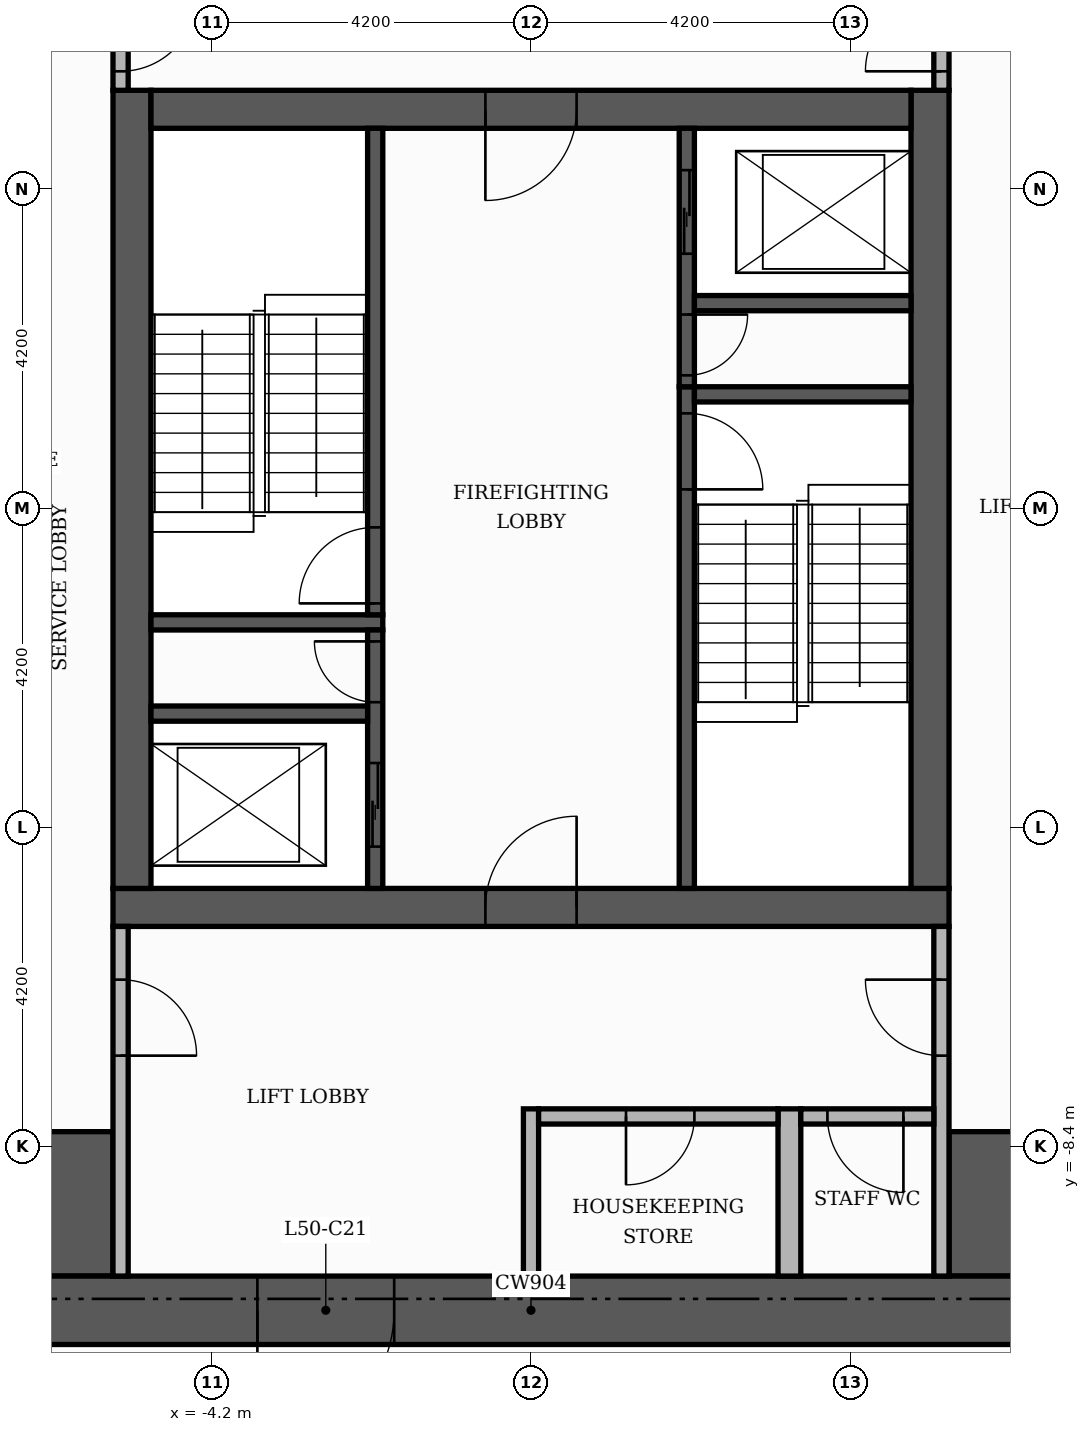
"""IFC4 building model, lengths in metres.
Left out: names, types, materials, properties, quantities, classifications, styles, units other than length and angle.
Written with IfcOpenShell. Run it as: python <this file> out.ifc"""

import sys

from ifc_helpers import new_model, si_unit, direction, frame, frame_2d, origin, place, context, subcontext, project, spatial, rectangle, extrude, element, fill, save


model = new_model("IFC4")
c1 = context("Model", 3, precision=1e-05, world=origin(), true_north=direction((0.0, 1.0)))
c2 = subcontext(c1, "Body", "Model", "MODEL_VIEW")
j1 = project(units=[si_unit("LENGTHUNIT", "METRE"), si_unit("PLANEANGLEUNIT", "RADIAN")], contexts=[c1])
p1 = place(None, origin())
s1 = spatial("IfcSite", under=j1, at=p1, CompositionType="ELEMENT")
p2 = place(p1, origin())
s2 = spatial("IfcBuilding", under=s1, at=p2, CompositionType="ELEMENT")
p3 = place(p2, frame((0.0, 0.0, 211.8)))
s3 = spatial("IfcBuildingStorey", under=s2, at=p3, CompositionType="ELEMENT", Elevation=211.8)
p4 = place(p3, frame((-5.5, -5.25, 0.0), z_axis=(0.0, 0.0, 1.0), x_axis=(1.0, 0.0, 0.0)))
e1 = element("IfcWall", 1, at=p4, inside=s3, PredefinedType="SHEAR", context=c2, shape_type="SweptSolid", body=[
    extrude(rectangle(XDim=11.0, YDim=0.5, at=frame_2d((5.5, 0.0))), origin(), (0.0, 0.0, 1.0), 3.48),
])
p5 = place(p4, frame((4.9, 0.0, 0.0)))
e2 = element("IfcOpeningElement", 2, at=p5, cuts=e1, PredefinedType="OPENING", context=c2, shape_type="SweptSolid", body=[
    extrude(rectangle(XDim=1.2, YDim=2.1, at=frame_2d((0.6, 1.05))), frame((0.0, 0.26, 0.0), z_axis=(0.0, -1.0, 0.0), x_axis=(1.0, 0.0, 0.0)), (0.0, 0.0, 1.0), 0.52),
])
for number, where, z_axis, x_axis in (
    (3, (-5.25, -5.0, 0.0), (0.0, 0.0, 1.0), (0.0, 1.0, 0.0)),
    (4, (5.25, -5.0, 0.0), (0.0, 0.0, 1.0), (0.0, 1.0, 0.0)),
):
    element("IfcWall", number, at=place(p3, frame(where, z_axis=z_axis, x_axis=x_axis)), inside=s3, PredefinedType="SHEAR", context=c2, shape_type="SweptSolid", body=[
        extrude(rectangle(XDim=10.5, YDim=0.5, at=frame_2d((5.25, 0.0))), origin(), (0.0, 0.0, 1.0), 3.48),
    ])
p6 = place(p3, frame((-5.0, 5.25, 0.0), z_axis=(0.0, 0.0, 1.0), x_axis=(1.0, 0.0, 0.0)))
e5 = element("IfcWall", 5, at=p6, inside=s3, PredefinedType="SHEAR", context=c2, shape_type="SweptSolid", body=[
    extrude(rectangle(XDim=10.0, YDim=0.5, at=frame_2d((5.0, 0.0))), origin(), (0.0, 0.0, 1.0), 3.48),
])
p7 = place(p6, frame((4.4, 0.0, 0.0)))
e6 = element("IfcOpeningElement", 6, at=p7, cuts=e5, PredefinedType="OPENING", context=c2, shape_type="SweptSolid", body=[
    extrude(rectangle(XDim=1.2, YDim=2.1, at=frame_2d((0.6, 1.05))), frame((0.0, 0.26, 0.0), z_axis=(0.0, -1.0, 0.0), x_axis=(1.0, 0.0, 0.0)), (0.0, 0.0, 1.0), 0.52),
])
for number, where, z_axis, x_axis in (
    (7, (-10.1, -9.15, 0.0), (0.0, 0.0, 1.0), (1.0, 0.0, 0.0)),
    (8, (5.5, -9.15, 0.0), (0.0, 0.0, 1.0), (1.0, 0.0, 0.0)),
):
    element("IfcWall", number, at=place(p3, frame(where, z_axis=z_axis, x_axis=x_axis)), inside=s3, PredefinedType="SHEAR", context=c2, shape_type="SweptSolid", body=[
        extrude(rectangle(XDim=4.6, YDim=1.9, at=frame_2d((2.3, 0.0))), origin(), (0.0, 0.0, 1.0), 3.48),
    ])
p8 = place(p3, frame((2.05, -5.0, 0.0), z_axis=(0.0, 0.0, 1.0), x_axis=(0.0, 1.0, 0.0)))
e9 = element("IfcWall", 9, at=p8, inside=s3, PredefinedType="SHEAR", context=c2, shape_type="SweptSolid", body=[
    extrude(rectangle(XDim=6.6, YDim=0.2, at=frame_2d((3.3, 0.0))), origin(), (0.0, 0.0, 1.0), 3.48),
])
p9 = place(p8, frame((5.25, 0.0, 0.0)))
e10 = element("IfcOpeningElement", 10, at=p9, cuts=e9, PredefinedType="OPENING", context=c2, shape_type="SweptSolid", body=[
    extrude(rectangle(XDim=1.0, YDim=2.1, at=frame_2d((0.5, 1.05))), frame((0.0, 0.11, 0.0), z_axis=(0.0, -1.0, 0.0), x_axis=(1.0, 0.0, 0.0)), (0.0, 0.0, 1.0), 0.22),
])
p10 = place(p3, frame((-5.0, -1.5, 0.0), z_axis=(0.0, 0.0, 1.0), x_axis=(1.0, 0.0, 0.0)))
e11 = element("IfcWall", 11, at=p10, inside=s3, PredefinedType="SHEAR", context=c2, shape_type="SweptSolid", body=[
    extrude(rectangle(XDim=3.05, YDim=0.2, at=frame_2d((1.525, 0.0))), origin(), (0.0, 0.0, 1.0), 3.48),
])
p11 = place(p3, frame((-2.05, -1.4, 0.0), z_axis=(0.0, 0.0, 1.0), x_axis=(0.0, 1.0, 0.0)))
e12 = element("IfcWall", 12, at=p11, inside=s3, PredefinedType="SHEAR", context=c2, shape_type="SweptSolid", body=[
    extrude(rectangle(XDim=6.4, YDim=0.2, at=frame_2d((3.2, 0.0))), origin(), (0.0, 0.0, 1.0), 3.48),
])
p12 = place(p11, frame((0.15, 0.0, 0.0)))
e13 = element("IfcOpeningElement", 13, at=p12, cuts=e12, PredefinedType="OPENING", context=c2, shape_type="SweptSolid", body=[
    extrude(rectangle(XDim=1.0, YDim=2.1, at=frame_2d((0.5, 1.05))), frame((0.0, 0.11, 0.0), z_axis=(0.0, -1.0, 0.0), x_axis=(1.0, 0.0, 0.0)), (0.0, 0.0, 1.0), 0.22),
])
p13 = place(p3, frame((2.15, 1.5, 0.0), z_axis=(0.0, 0.0, 1.0), x_axis=(1.0, 0.0, 0.0)))
e14 = element("IfcWall", 14, at=p13, inside=s3, PredefinedType="SHEAR", context=c2, shape_type="SweptSolid", body=[
    extrude(rectangle(XDim=2.85, YDim=0.2, at=frame_2d((1.425, 0.0))), origin(), (0.0, 0.0, 1.0), 3.48),
])
p14 = place(p3, frame((-2.05, -5.0, 0.0), z_axis=(0.0, 0.0, 1.0), x_axis=(0.0, 1.0, 0.0)))
e15 = element("IfcWall", 15, at=p14, inside=s3, PredefinedType="SHEAR", context=c2, shape_type="SweptSolid", body=[
    extrude(rectangle(XDim=3.4, YDim=0.2, at=frame_2d((1.7, 0.0))), origin(), (0.0, 0.0, 1.0), 3.48),
])
p15 = place(p14, frame((0.55, 0.0, 0.0)))
e16 = element("IfcOpeningElement", 16, at=p15, cuts=e15, PredefinedType="OPENING", context=c2, shape_type="SweptSolid", body=[
    extrude(rectangle(XDim=1.1, YDim=2.1, at=frame_2d((0.55, 1.05))), frame((0.0, 0.11, 0.0), z_axis=(0.0, -1.0, 0.0), x_axis=(1.0, 0.0, 0.0)), (0.0, 0.0, 1.0), 0.22),
])
p16 = place(p14, frame((2.45, 0.0, 0.0)))
e17 = element("IfcOpeningElement", 17, at=p16, cuts=e15, PredefinedType="OPENING", context=c2, shape_type="SweptSolid", body=[
    extrude(rectangle(XDim=0.8, YDim=2.1, at=frame_2d((0.4, 1.05))), frame((0.0, 0.11, 0.0), z_axis=(0.0, -1.0, 0.0), x_axis=(1.0, 0.0, 0.0)), (0.0, 0.0, 1.0), 0.22),
])
p17 = place(p3, frame((-5.0, -2.7, 0.0), z_axis=(0.0, 0.0, 1.0), x_axis=(1.0, 0.0, 0.0)))
e18 = element("IfcWall", 18, at=p17, inside=s3, PredefinedType="SHEAR", context=c2, shape_type="SweptSolid", body=[
    extrude(rectangle(XDim=2.85, YDim=0.2, at=frame_2d((1.425, 0.0))), origin(), (0.0, 0.0, 1.0), 3.48),
])
p18 = place(p3, frame((2.05, 1.6, 0.0), z_axis=(0.0, 0.0, 1.0), x_axis=(0.0, 1.0, 0.0)))
e19 = element("IfcWall", 19, at=p18, inside=s3, PredefinedType="SHEAR", context=c2, shape_type="SweptSolid", body=[
    extrude(rectangle(XDim=3.4, YDim=0.2, at=frame_2d((1.7, 0.0))), origin(), (0.0, 0.0, 1.0), 3.48),
])
p19 = place(p18, frame((1.75, 0.0, 0.0)))
e20 = element("IfcOpeningElement", 20, at=p19, cuts=e19, PredefinedType="OPENING", context=c2, shape_type="SweptSolid", body=[
    extrude(rectangle(XDim=1.1, YDim=2.1, at=frame_2d((0.55, 1.05))), frame((0.0, 0.11, 0.0), z_axis=(0.0, -1.0, 0.0), x_axis=(1.0, 0.0, 0.0)), (0.0, 0.0, 1.0), 0.22),
])
p20 = place(p18, frame((0.15, 0.0, 0.0)))
e21 = element("IfcOpeningElement", 21, at=p20, cuts=e19, PredefinedType="OPENING", context=c2, shape_type="SweptSolid", body=[
    extrude(rectangle(XDim=0.8, YDim=2.1, at=frame_2d((0.4, 1.05))), frame((0.0, 0.11, 0.0), z_axis=(0.0, -1.0, 0.0), x_axis=(1.0, 0.0, 0.0)), (0.0, 0.0, 1.0), 0.22),
])
p21 = place(p3, frame((2.15, 2.7, 0.0), z_axis=(0.0, 0.0, 1.0), x_axis=(1.0, 0.0, 0.0)))
e22 = element("IfcWall", 22, at=p21, inside=s3, PredefinedType="SHEAR", context=c2, shape_type="SweptSolid", body=[
    extrude(rectangle(XDim=2.85, YDim=0.2, at=frame_2d((1.425, 0.0))), origin(), (0.0, 0.0, 1.0), 3.48),
])
p22 = place(p3, frame((-11.0, -10.55, 0.0), z_axis=(0.0, 0.0, 1.0), x_axis=(1.0, 0.0, 0.0)))
e23 = element("IfcWall", 23, at=p22, inside=s3, PredefinedType="SHEAR", context=c2, shape_type="SweptSolid", body=[
    extrude(rectangle(XDim=22.0, YDim=0.9, at=frame_2d((11.0, 0.0))), origin(), (0.0, 0.0, 1.0), 3.48),
])
p23 = place(p22, frame((7.4, 0.0, 0.0)))
e24 = element("IfcOpeningElement", 24, at=p23, cuts=e23, PredefinedType="OPENING", context=c2, shape_type="SweptSolid", body=[
    extrude(rectangle(XDim=1.8, YDim=2.2, at=frame_2d((0.9, 1.1))), frame((0.0, 0.46, 0.0), z_axis=(0.0, -1.0, 0.0), x_axis=(1.0, 0.0, 0.0)), (0.0, 0.0, 1.0), 0.92),
])
p24 = place(p3, frame((-5.4, -10.1, 0.0), z_axis=(0.0, 0.0, 1.0), x_axis=(0.0, 1.0, 0.0)))
e25 = element("IfcWall", 25, at=p24, inside=s3, PredefinedType="PARTITIONING", context=c2, shape_type="SweptSolid", body=[
    extrude(rectangle(XDim=4.6, YDim=0.2, at=frame_2d((2.3, 0.0))), origin(), (0.0, 0.0, 1.0), 3.48),
])
p25 = place(p24, frame((2.9, 0.0, 0.0)))
e26 = element("IfcOpeningElement", 26, at=p25, cuts=e25, PredefinedType="OPENING", context=c2, shape_type="SweptSolid", body=[
    extrude(rectangle(XDim=1.0, YDim=2.1, at=frame_2d((0.5, 1.05))), frame((0.0, 0.11, 0.0), z_axis=(0.0, -1.0, 0.0), x_axis=(1.0, 0.0, 0.0)), (0.0, 0.0, 1.0), 0.22),
])
p26 = place(p3, frame((0.0, -10.1, 0.0), z_axis=(0.0, 0.0, 1.0), x_axis=(0.0, 1.0, 0.0)))
e27 = element("IfcWall", 27, at=p26, inside=s3, PredefinedType="PARTITIONING", context=c2, shape_type="SweptSolid", body=[
    extrude(rectangle(XDim=2.2, YDim=0.2, at=frame_2d((1.1, 0.0))), origin(), (0.0, 0.0, 1.0), 3.48),
])
p27 = place(p3, frame((3.4, -10.1, 0.0), z_axis=(0.0, 0.0, 1.0), x_axis=(0.0, 1.0, 0.0)))
e28 = element("IfcWall", 28, at=p27, inside=s3, PredefinedType="PARTITIONING", context=c2, shape_type="SweptSolid", body=[
    extrude(rectangle(XDim=2.2, YDim=0.3, at=frame_2d((1.1, 0.0))), origin(), (0.0, 0.0, 1.0), 3.48),
])
p28 = place(p3, frame((5.4, -10.1, 0.0), z_axis=(0.0, 0.0, 1.0), x_axis=(0.0, 1.0, 0.0)))
e29 = element("IfcWall", 29, at=p28, inside=s3, PredefinedType="PARTITIONING", context=c2, shape_type="SweptSolid", body=[
    extrude(rectangle(XDim=4.6, YDim=0.2, at=frame_2d((2.3, 0.0))), origin(), (0.0, 0.0, 1.0), 3.48),
])
p29 = place(p28, frame((2.9, 0.0, 0.0)))
e30 = element("IfcOpeningElement", 30, at=p29, cuts=e29, PredefinedType="OPENING", context=c2, shape_type="SweptSolid", body=[
    extrude(rectangle(XDim=1.0, YDim=2.1, at=frame_2d((0.5, 1.05))), frame((0.0, 0.11, 0.0), z_axis=(0.0, -1.0, 0.0), x_axis=(1.0, 0.0, 0.0)), (0.0, 0.0, 1.0), 0.22),
])
p30 = place(p3, frame((0.1, -8.0, 0.0), z_axis=(0.0, 0.0, 1.0), x_axis=(1.0, 0.0, 0.0)))
e31 = element("IfcWall", 31, at=p30, inside=s3, PredefinedType="PARTITIONING", context=c2, shape_type="SweptSolid", body=[
    extrude(rectangle(XDim=3.15, YDim=0.2, at=frame_2d((1.575, 0.0))), origin(), (0.0, 0.0, 1.0), 3.48),
])
p31 = place(p30, frame((1.15, 0.0, 0.0)))
e32 = element("IfcOpeningElement", 32, at=p31, cuts=e31, PredefinedType="OPENING", context=c2, shape_type="SweptSolid", body=[
    extrude(rectangle(XDim=0.9, YDim=2.1, at=frame_2d((0.45, 1.05))), frame((0.0, 0.11, 0.0), z_axis=(0.0, -1.0, 0.0), x_axis=(1.0, 0.0, 0.0)), (0.0, 0.0, 1.0), 0.22),
])
p32 = place(p3, frame((3.55, -8.0, 0.0), z_axis=(0.0, 0.0, 1.0), x_axis=(1.0, 0.0, 0.0)))
e33 = element("IfcWall", 33, at=p32, inside=s3, PredefinedType="PARTITIONING", context=c2, shape_type="SweptSolid", body=[
    extrude(rectangle(XDim=1.75, YDim=0.2, at=frame_2d((0.875, 0.0))), origin(), (0.0, 0.0, 1.0), 3.48),
])
p33 = place(p32, frame((0.35, 0.0, 0.0)))
e34 = element("IfcOpeningElement", 34, at=p33, cuts=e33, PredefinedType="OPENING", context=c2, shape_type="SweptSolid", body=[
    extrude(rectangle(XDim=1.0, YDim=2.1, at=frame_2d((0.5, 1.05))), frame((0.0, 0.11, 0.0), z_axis=(0.0, -1.0, 0.0), x_axis=(1.0, 0.0, 0.0)), (0.0, 0.0, 1.0), 0.22),
])
p34 = place(p3, frame((-5.4, 5.5, 0.0), z_axis=(0.0, 0.0, 1.0), x_axis=(0.0, 1.0, 0.0)))
e35 = element("IfcWall", 35, at=p34, inside=s3, PredefinedType="PARTITIONING", context=c2, shape_type="SweptSolid", body=[
    extrude(rectangle(XDim=1.55, YDim=0.2, at=frame_2d((0.775, 0.0))), origin(), (0.0, 0.0, 1.0), 3.48),
])
p35 = place(p34, frame((0.25, 0.0, 0.0)))
e36 = element("IfcOpeningElement", 36, at=p35, cuts=e35, PredefinedType="OPENING", context=c2, shape_type="SweptSolid", body=[
    extrude(rectangle(XDim=1.0, YDim=2.1, at=frame_2d((0.5, 1.05))), frame((0.0, 0.11, 0.0), z_axis=(0.0, -1.0, 0.0), x_axis=(1.0, 0.0, 0.0)), (0.0, 0.0, 1.0), 0.22),
])
p36 = place(p3, frame((5.4, 5.5, 0.0), z_axis=(0.0, 0.0, 1.0), x_axis=(0.0, 1.0, 0.0)))
e37 = element("IfcWall", 37, at=p36, inside=s3, PredefinedType="PARTITIONING", context=c2, shape_type="SweptSolid", body=[
    extrude(rectangle(XDim=4.6, YDim=0.2, at=frame_2d((2.3, 0.0))), origin(), (0.0, 0.0, 1.0), 3.48),
])
p37 = place(p36, frame((0.25, 0.0, 0.0)))
e38 = element("IfcOpeningElement", 38, at=p37, cuts=e37, PredefinedType="OPENING", context=c2, shape_type="SweptSolid", body=[
    extrude(rectangle(XDim=1.0, YDim=2.1, at=frame_2d((0.5, 1.05))), frame((0.0, 0.11, 0.0), z_axis=(0.0, -1.0, 0.0), x_axis=(1.0, 0.0, 0.0)), (0.0, 0.0, 1.0), 0.22),
])
p38 = place(p19, origin())
e39 = element("IfcDoor", 39, at=p38, inside=s3, OperationType="SLIDING_TO_LEFT", PredefinedType="DOOR", context=c2, shape_type="SweptSolid", body=[
    extrude(rectangle(XDim=1.1, YDim=2.1, at=frame_2d((0.55, 1.05))), frame((0.0, 0.025, 0.0), z_axis=(0.0, -1.0, 0.0), x_axis=(1.0, 0.0, 0.0)), (0.0, 0.0, 1.0), 0.05),
])
fill(e20, e39)
p39 = place(p15, origin())
e40 = element("IfcDoor", 40, at=p39, inside=s3, OperationType="SLIDING_TO_LEFT", PredefinedType="DOOR", context=c2, shape_type="SweptSolid", body=[
    extrude(rectangle(XDim=1.1, YDim=2.1, at=frame_2d((0.55, 1.05))), frame((0.0, 0.025, 0.0), z_axis=(0.0, -1.0, 0.0), x_axis=(1.0, 0.0, 0.0)), (0.0, 0.0, 1.0), 0.05),
])
fill(e16, e40)
p40 = place(p12, origin())
e41 = element("IfcDoor", 41, at=p40, inside=s3, OperationType="SINGLE_SWING_LEFT", PredefinedType="DOOR", context=c2, shape_type="SweptSolid", body=[
    extrude(rectangle(XDim=1.0, YDim=2.1, at=frame_2d((0.5, 1.05))), frame((0.0, 0.025, 0.0), z_axis=(0.0, -1.0, 0.0), x_axis=(1.0, 0.0, 0.0)), (0.0, 0.0, 1.0), 0.05),
])
fill(e13, e41)
p41 = place(p9, frame((1.0, 0.0, 0.0), z_axis=(0.0, 0.0, 1.0), x_axis=(-1.0, 0.0, 0.0)))
e42 = element("IfcDoor", 42, at=p41, inside=s3, OperationType="SINGLE_SWING_LEFT", PredefinedType="DOOR", context=c2, shape_type="SweptSolid", body=[
    extrude(rectangle(XDim=1.0, YDim=2.1, at=frame_2d((0.5, 1.05))), frame((0.0, 0.025, 0.0), z_axis=(0.0, -1.0, 0.0), x_axis=(1.0, 0.0, 0.0)), (0.0, 0.0, 1.0), 0.05),
])
fill(e10, e42)
p42 = place(p20, frame((0.8, 0.0, 0.0), z_axis=(0.0, 0.0, 1.0), x_axis=(-1.0, 0.0, 0.0)))
e43 = element("IfcDoor", 43, at=p42, inside=s3, OperationType="SINGLE_SWING_RIGHT", PredefinedType="DOOR", context=c2, shape_type="SweptSolid", body=[
    extrude(rectangle(XDim=0.8, YDim=2.1, at=frame_2d((0.4, 1.05))), frame((0.0, 0.025, 0.0), z_axis=(0.0, -1.0, 0.0), x_axis=(1.0, 0.0, 0.0)), (0.0, 0.0, 1.0), 0.05),
])
fill(e21, e43)
p43 = place(p16, origin())
e44 = element("IfcDoor", 44, at=p43, inside=s3, OperationType="SINGLE_SWING_RIGHT", PredefinedType="DOOR", context=c2, shape_type="SweptSolid", body=[
    extrude(rectangle(XDim=0.8, YDim=2.1, at=frame_2d((0.4, 1.05))), frame((0.0, 0.025, 0.0), z_axis=(0.0, -1.0, 0.0), x_axis=(1.0, 0.0, 0.0)), (0.0, 0.0, 1.0), 0.05),
])
fill(e17, e44)
p44 = place(p7, frame((1.2, 0.0, 0.0), z_axis=(0.0, 0.0, 1.0), x_axis=(-1.0, 0.0, 0.0)))
e45 = element("IfcDoor", 45, at=p44, inside=s3, OperationType="SINGLE_SWING_LEFT", PredefinedType="DOOR", context=c2, shape_type="SweptSolid", body=[
    extrude(rectangle(XDim=1.2, YDim=2.1, at=frame_2d((0.6, 1.05))), frame((0.0, 0.025, 0.0), z_axis=(0.0, -1.0, 0.0), x_axis=(1.0, 0.0, 0.0)), (0.0, 0.0, 1.0), 0.05),
])
fill(e6, e45)
p45 = place(p5, origin())
e46 = element("IfcDoor", 46, at=p45, inside=s3, OperationType="SINGLE_SWING_RIGHT", PredefinedType="DOOR", context=c2, shape_type="SweptSolid", body=[
    extrude(rectangle(XDim=1.2, YDim=2.1, at=frame_2d((0.6, 1.05))), frame((0.0, 0.025, 0.0), z_axis=(0.0, -1.0, 0.0), x_axis=(1.0, 0.0, 0.0)), (0.0, 0.0, 1.0), 0.05),
])
fill(e2, e46)
p46 = place(p35, frame((1.0, 0.0, 0.0), z_axis=(0.0, 0.0, 1.0), x_axis=(-1.0, 0.0, 0.0)))
e47 = element("IfcDoor", 47, at=p46, inside=s3, OperationType="SINGLE_SWING_RIGHT", PredefinedType="DOOR", context=c2, shape_type="SweptSolid", body=[
    extrude(rectangle(XDim=1.0, YDim=2.1, at=frame_2d((0.5, 1.05))), frame((0.0, 0.025, 0.0), z_axis=(0.0, -1.0, 0.0), x_axis=(1.0, 0.0, 0.0)), (0.0, 0.0, 1.0), 0.05),
])
fill(e36, e47)
p47 = place(p37, origin())
e48 = element("IfcDoor", 48, at=p47, inside=s3, OperationType="SINGLE_SWING_LEFT", PredefinedType="DOOR", context=c2, shape_type="SweptSolid", body=[
    extrude(rectangle(XDim=1.0, YDim=2.1, at=frame_2d((0.5, 1.05))), frame((0.0, 0.025, 0.0), z_axis=(0.0, -1.0, 0.0), x_axis=(1.0, 0.0, 0.0)), (0.0, 0.0, 1.0), 0.05),
])
fill(e38, e48)
p48 = place(p25, frame((1.0, 0.0, 0.0), z_axis=(0.0, 0.0, 1.0), x_axis=(-1.0, 0.0, 0.0)))
e49 = element("IfcDoor", 49, at=p48, inside=s3, OperationType="SINGLE_SWING_LEFT", PredefinedType="DOOR", context=c2, shape_type="SweptSolid", body=[
    extrude(rectangle(XDim=1.0, YDim=2.1, at=frame_2d((0.5, 1.05))), frame((0.0, 0.025, 0.0), z_axis=(0.0, -1.0, 0.0), x_axis=(1.0, 0.0, 0.0)), (0.0, 0.0, 1.0), 0.05),
])
fill(e26, e49)
p49 = place(p29, origin())
e50 = element("IfcDoor", 50, at=p49, inside=s3, OperationType="SINGLE_SWING_RIGHT", PredefinedType="DOOR", context=c2, shape_type="SweptSolid", body=[
    extrude(rectangle(XDim=1.0, YDim=2.1, at=frame_2d((0.5, 1.05))), frame((0.0, 0.025, 0.0), z_axis=(0.0, -1.0, 0.0), x_axis=(1.0, 0.0, 0.0)), (0.0, 0.0, 1.0), 0.05),
])
fill(e30, e50)
p50 = place(p23, frame((1.8, 0.0, 0.0), z_axis=(0.0, 0.0, 1.0), x_axis=(-1.0, 0.0, 0.0)))
e51 = element("IfcDoor", 51, at=p50, inside=s3, OperationType="DOUBLE_DOOR_SINGLE_SWING", PredefinedType="DOOR", context=c2, shape_type="SweptSolid", body=[
    extrude(rectangle(XDim=1.8, YDim=2.2, at=frame_2d((0.9, 1.1))), frame((0.0, 0.025, 0.0), z_axis=(0.0, -1.0, 0.0), x_axis=(1.0, 0.0, 0.0)), (0.0, 0.0, 1.0), 0.05),
])
fill(e24, e51)
p51 = place(p31, frame((0.9, 0.0, 0.0), z_axis=(0.0, 0.0, 1.0), x_axis=(-1.0, 0.0, 0.0)))
e52 = element("IfcDoor", 52, at=p51, inside=s3, OperationType="SINGLE_SWING_LEFT", PredefinedType="DOOR", context=c2, shape_type="SweptSolid", body=[
    extrude(rectangle(XDim=0.9, YDim=2.1, at=frame_2d((0.45, 1.05))), frame((0.0, 0.025, 0.0), z_axis=(0.0, -1.0, 0.0), x_axis=(1.0, 0.0, 0.0)), (0.0, 0.0, 1.0), 0.05),
])
fill(e32, e52)
p52 = place(p33, frame((1.0, 0.0, 0.0), z_axis=(0.0, 0.0, 1.0), x_axis=(-1.0, 0.0, 0.0)))
e53 = element("IfcDoor", 53, at=p52, inside=s3, OperationType="SINGLE_SWING_RIGHT", PredefinedType="DOOR", context=c2, shape_type="SweptSolid", body=[
    extrude(rectangle(XDim=1.0, YDim=2.1, at=frame_2d((0.5, 1.05))), frame((0.0, 0.025, 0.0), z_axis=(0.0, -1.0, 0.0), x_axis=(1.0, 0.0, 0.0)), (0.0, 0.0, 1.0), 0.05),
])
fill(e34, e53)
save(model, sys.argv[1])
